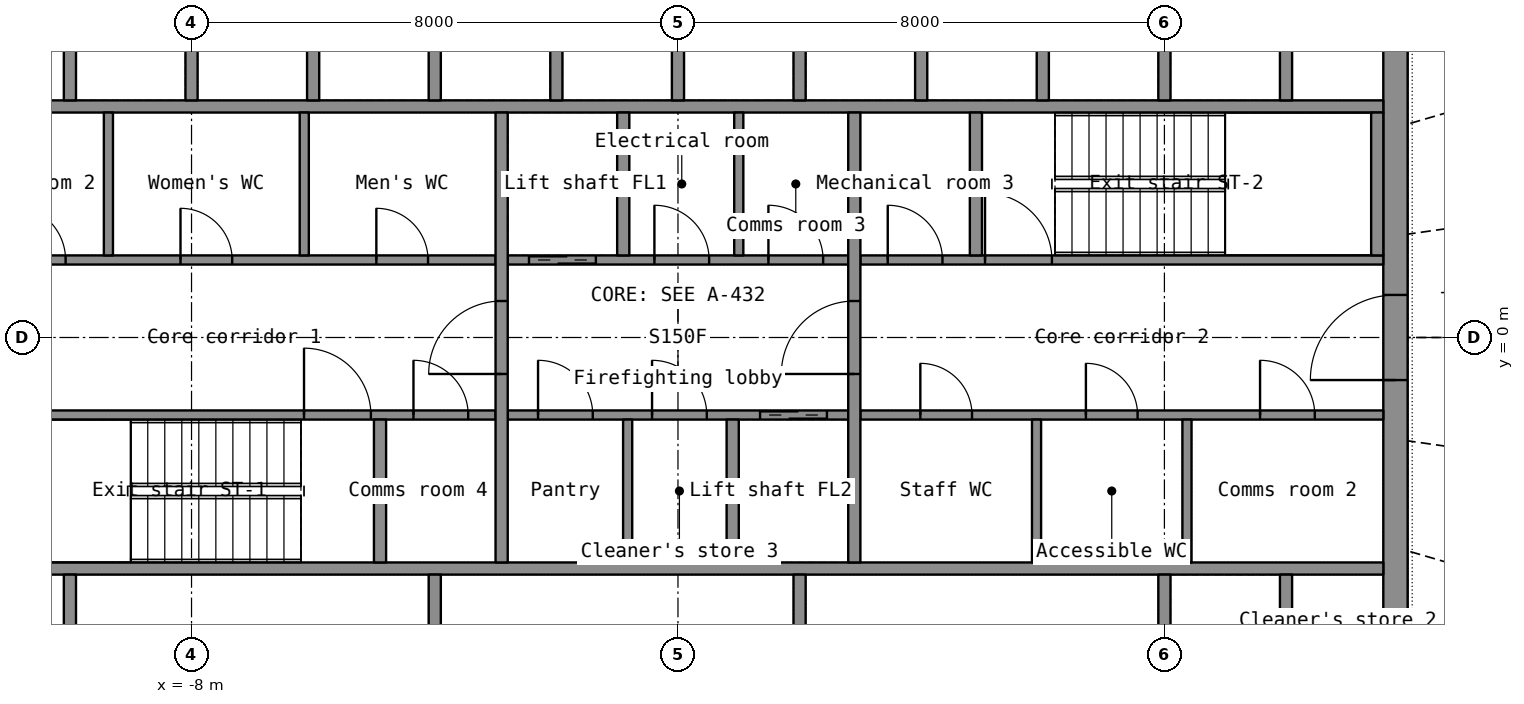
"""IFC4 building model, lengths in metres.
Left out: names, types, materials, properties, quantities, classifications, styles, units other than length and angle.
Written with IfcOpenShell. Run it as: python <this file> out.ifc"""

import sys

from ifc_helpers import new_model, si_unit, direction, frame, frame_2d, origin, place, context, subcontext, project, spatial, rectangle, extrude, element, fill, save


model = new_model("IFC4")
c1 = context("Model", 3, precision=1e-05, world=origin(), true_north=direction((0.0, 1.0)))
c2 = subcontext(c1, "Body", "Model", "MODEL_VIEW")
j1 = project(units=[si_unit("LENGTHUNIT", "METRE"), si_unit("PLANEANGLEUNIT", "RADIAN")], contexts=[c1])
p1 = place(None, origin())
s1 = spatial("IfcSite", under=j1, at=p1, CompositionType="ELEMENT")
p2 = place(p1, origin())
s2 = spatial("IfcBuilding", under=s1, at=p2, CompositionType="ELEMENT")
p3 = place(p2, frame((0.0, 0.0, 254.1)))
s3 = spatial("IfcBuildingStorey", under=s2, at=p3, CompositionType="ELEMENT", Elevation=254.1)
p4 = place(p3, frame((11.8, -7.2, 0.0), z_axis=(0.0, 0.0, 1.0), x_axis=(0.0, 1.0, 0.0)))
e1 = element("IfcWall", 1, at=p4, inside=s3, PredefinedType="SHEAR", context=c2, shape_type="SweptSolid", body=[
    extrude(rectangle(XDim=14.4, YDim=0.4, at=frame_2d((7.2, 0.0))), origin(), (0.0, 0.0, 1.0), 3.3),
])
p5 = place(p4, frame((6.5, 0.0, 0.0)))
e2 = element("IfcOpeningElement", 2, at=p5, cuts=e1, PredefinedType="OPENING", context=c2, shape_type="SweptSolid", body=[
    extrude(rectangle(XDim=1.4, YDim=2.2, at=frame_2d((0.7, 1.1))), frame((0.0, 0.21, 0.0), z_axis=(0.0, -1.0, 0.0), x_axis=(1.0, 0.0, 0.0)), (0.0, 0.0, 1.0), 0.42),
])
for number, where, z_axis, x_axis in (
    (3, (-11.6, -3.8, 0.0), (0.0, 0.0, 1.0), (1.0, 0.0, 0.0)),
    (4, (-11.6, 3.8, 0.0), (0.0, 0.0, 1.0), (1.0, 0.0, 0.0)),
):
    element("IfcWall", number, at=place(p3, frame(where, z_axis=z_axis, x_axis=x_axis)), inside=s3, PredefinedType="SHEAR", context=c2, shape_type="SweptSolid", body=[
        extrude(rectangle(XDim=23.2, YDim=0.2, at=frame_2d((11.6, 0.0))), origin(), (0.0, 0.0, 1.0), 3.3),
    ])
for number, where, z_axis, x_axis in (
    (5, (-10.0, -6.8, 0.0), (0.0, 0.0, 1.0), (0.0, 1.0, 0.0)),
    (6, (8.0, -6.8, 0.0), (0.0, 0.0, 1.0), (0.0, 1.0, 0.0)),
    (7, (10.0, -6.8, 0.0), (0.0, 0.0, 1.0), (0.0, 1.0, 0.0)),
):
    element("IfcWall", number, at=place(p3, frame(where, z_axis=z_axis, x_axis=x_axis)), inside=s3, PredefinedType="SHEAR", context=c2, shape_type="SweptSolid", body=[
        extrude(rectangle(XDim=2.9, YDim=0.2, at=frame_2d((1.45, 0.0))), origin(), (0.0, 0.0, 1.0), 3.3),
    ])
for number, where, z_axis, x_axis in (
    (8, (-4.0, -6.8, 0.0), (0.0, 0.0, 1.0), (0.0, 1.0, 0.0)),
    (9, (2.0, -6.8, 0.0), (0.0, 0.0, 1.0), (0.0, 1.0, 0.0)),
):
    element("IfcWall", number, at=place(p3, frame(where, z_axis=z_axis, x_axis=x_axis)), inside=s3, PredefinedType="PARTITIONING", context=c2, shape_type="SweptSolid", body=[
        extrude(rectangle(XDim=2.9, YDim=0.2, at=frame_2d((1.45, 0.0))), origin(), (0.0, 0.0, 1.0), 3.3),
    ])
for number, where, z_axis, x_axis in (
    (10, (-10.0, 3.9, 0.0), (0.0, 0.0, 1.0), (0.0, 1.0, 0.0)),
    (11, (-8.0, 3.9, 0.0), (0.0, 0.0, 1.0), (0.0, 1.0, 0.0)),
    (12, (-6.0, 3.9, 0.0), (0.0, 0.0, 1.0), (0.0, 1.0, 0.0)),
    (13, (-4.0, 3.9, 0.0), (0.0, 0.0, 1.0), (0.0, 1.0, 0.0)),
    (14, (-2.0, 3.9, 0.0), (0.0, 0.0, 1.0), (0.0, 1.0, 0.0)),
    (15, (0.0, 3.9, 0.0), (0.0, 0.0, 1.0), (0.0, 1.0, 0.0)),
    (16, (2.0, 3.9, 0.0), (0.0, 0.0, 1.0), (0.0, 1.0, 0.0)),
    (17, (4.0, 3.9, 0.0), (0.0, 0.0, 1.0), (0.0, 1.0, 0.0)),
    (18, (6.0, 3.9, 0.0), (0.0, 0.0, 1.0), (0.0, 1.0, 0.0)),
    (19, (8.0, 3.9, 0.0), (0.0, 0.0, 1.0), (0.0, 1.0, 0.0)),
    (20, (10.0, 3.9, 0.0), (0.0, 0.0, 1.0), (0.0, 1.0, 0.0)),
):
    element("IfcWall", number, at=place(p3, frame(where, z_axis=z_axis, x_axis=x_axis)), inside=s3, PredefinedType="SHEAR", context=c2, shape_type="SweptSolid", body=[
        extrude(rectangle(XDim=2.9, YDim=0.2, at=frame_2d((1.45, 0.0))), origin(), (0.0, 0.0, 1.0), 3.3),
    ])
p6 = place(p3, frame((-11.6, -1.275, 0.0), z_axis=(0.0, 0.0, 1.0), x_axis=(1.0, 0.0, 0.0)))
e21 = element("IfcWall", 21, at=p6, inside=s3, PredefinedType="SHEAR", context=c2, shape_type="SweptSolid", body=[
    extrude(rectangle(XDim=8.6, YDim=0.15, at=frame_2d((4.3, 0.0))), origin(), (0.0, 0.0, 1.0), 3.3),
])
p7 = place(p6, frame((5.45, 0.0, 0.0)))
e22 = element("IfcOpeningElement", 22, at=p7, cuts=e21, PredefinedType="OPENING", context=c2, shape_type="SweptSolid", body=[
    extrude(rectangle(XDim=1.1, YDim=2.15, at=frame_2d((0.55, 1.075))), frame((0.0, 0.085, 0.0), z_axis=(0.0, -1.0, 0.0), x_axis=(1.0, 0.0, 0.0)), (0.0, 0.0, 1.0), 0.17),
])
p8 = place(p6, frame((7.25, 0.0, 0.0)))
e23 = element("IfcOpeningElement", 23, at=p8, cuts=e21, PredefinedType="OPENING", context=c2, shape_type="SweptSolid", body=[
    extrude(rectangle(XDim=0.9, YDim=2.1, at=frame_2d((0.45, 1.05))), frame((0.0, 0.085, 0.0), z_axis=(0.0, -1.0, 0.0), x_axis=(1.0, 0.0, 0.0)), (0.0, 0.0, 1.0), 0.17),
])
p9 = place(p3, frame((-2.8, -1.275, 0.0), z_axis=(0.0, 0.0, 1.0), x_axis=(1.0, 0.0, 0.0)))
e24 = element("IfcWall", 24, at=p9, inside=s3, PredefinedType="SHEAR", context=c2, shape_type="SweptSolid", body=[
    extrude(rectangle(XDim=5.6, YDim=0.15, at=frame_2d((2.8, 0.0))), origin(), (0.0, 0.0, 1.0), 3.3),
])
p10 = place(p9, frame((4.15, 0.0, 0.0)))
e25 = element("IfcOpeningElement", 25, at=p10, cuts=e24, PredefinedType="OPENING", context=c2, shape_type="SweptSolid", body=[
    extrude(rectangle(XDim=1.1, YDim=2.2, at=frame_2d((0.55, 1.1))), frame((0.0, 0.085, 0.0), z_axis=(0.0, -1.0, 0.0), x_axis=(1.0, 0.0, 0.0)), (0.0, 0.0, 1.0), 0.17),
])
p11 = place(p9, frame((0.499, 0.0, 0.0)))
e26 = element("IfcOpeningElement", 26, at=p11, cuts=e24, PredefinedType="OPENING", context=c2, shape_type="SweptSolid", body=[
    extrude(rectangle(XDim=0.9, YDim=2.1, at=frame_2d((0.45, 1.05))), frame((0.0, 0.085, 0.0), z_axis=(0.0, -1.0, 0.0), x_axis=(1.0, 0.0, 0.0)), (0.0, 0.0, 1.0), 0.17),
])
p12 = place(p9, frame((2.374, 0.0, 0.0)))
e27 = element("IfcOpeningElement", 27, at=p12, cuts=e24, PredefinedType="OPENING", context=c2, shape_type="SweptSolid", body=[
    extrude(rectangle(XDim=0.9, YDim=2.1, at=frame_2d((0.45, 1.05))), frame((0.0, 0.085, 0.0), z_axis=(0.0, -1.0, 0.0), x_axis=(1.0, 0.0, 0.0)), (0.0, 0.0, 1.0), 0.17),
])
p13 = place(p3, frame((3.0, -1.275, 0.0), z_axis=(0.0, 0.0, 1.0), x_axis=(1.0, 0.0, 0.0)))
e28 = element("IfcWall", 28, at=p13, inside=s3, PredefinedType="PARTITIONING", context=c2, shape_type="SweptSolid", body=[
    extrude(rectangle(XDim=8.6, YDim=0.15, at=frame_2d((4.3, 0.0))), origin(), (0.0, 0.0, 1.0), 3.3),
])
p14 = place(p13, frame((0.986, 0.0, 0.0)))
e29 = element("IfcOpeningElement", 29, at=p14, cuts=e28, PredefinedType="OPENING", context=c2, shape_type="SweptSolid", body=[
    extrude(rectangle(XDim=0.85, YDim=2.1, at=frame_2d((0.425, 1.05))), frame((0.0, 0.085, 0.0), z_axis=(0.0, -1.0, 0.0), x_axis=(1.0, 0.0, 0.0)), (0.0, 0.0, 1.0), 0.17),
])
p15 = place(p13, frame((3.709, 0.0, 0.0)))
e30 = element("IfcOpeningElement", 30, at=p15, cuts=e28, PredefinedType="OPENING", context=c2, shape_type="SweptSolid", body=[
    extrude(rectangle(XDim=0.85, YDim=2.1, at=frame_2d((0.425, 1.05))), frame((0.0, 0.085, 0.0), z_axis=(0.0, -1.0, 0.0), x_axis=(1.0, 0.0, 0.0)), (0.0, 0.0, 1.0), 0.17),
])
p16 = place(p13, frame((6.573, 0.0, 0.0)))
e31 = element("IfcOpeningElement", 31, at=p16, cuts=e28, PredefinedType="OPENING", context=c2, shape_type="SweptSolid", body=[
    extrude(rectangle(XDim=0.9, YDim=2.1, at=frame_2d((0.45, 1.05))), frame((0.0, 0.085, 0.0), z_axis=(0.0, -1.0, 0.0), x_axis=(1.0, 0.0, 0.0)), (0.0, 0.0, 1.0), 0.17),
])
p17 = place(p3, frame((-11.6, 1.275, 0.0), z_axis=(0.0, 0.0, 1.0), x_axis=(1.0, 0.0, 0.0)))
e32 = element("IfcWall", 32, at=p17, inside=s3, PredefinedType="PARTITIONING", context=c2, shape_type="SweptSolid", body=[
    extrude(rectangle(XDim=8.6, YDim=0.15, at=frame_2d((4.3, 0.0))), origin(), (0.0, 0.0, 1.0), 3.3),
])
p18 = place(p17, frame((0.629, 0.0, 0.0)))
e33 = element("IfcOpeningElement", 33, at=p18, cuts=e32, PredefinedType="OPENING", context=c2, shape_type="SweptSolid", body=[
    extrude(rectangle(XDim=0.9, YDim=2.1, at=frame_2d((0.45, 1.05))), frame((0.0, 0.085, 0.0), z_axis=(0.0, -1.0, 0.0), x_axis=(1.0, 0.0, 0.0)), (0.0, 0.0, 1.0), 0.17),
])
p19 = place(p17, frame((3.418, 0.0, 0.0)))
e34 = element("IfcOpeningElement", 34, at=p19, cuts=e32, PredefinedType="OPENING", context=c2, shape_type="SweptSolid", body=[
    extrude(rectangle(XDim=0.85, YDim=2.1, at=frame_2d((0.425, 1.05))), frame((0.0, 0.085, 0.0), z_axis=(0.0, -1.0, 0.0), x_axis=(1.0, 0.0, 0.0)), (0.0, 0.0, 1.0), 0.17),
])
p20 = place(p17, frame((6.639, 0.0, 0.0)))
e35 = element("IfcOpeningElement", 35, at=p20, cuts=e32, PredefinedType="OPENING", context=c2, shape_type="SweptSolid", body=[
    extrude(rectangle(XDim=0.85, YDim=2.1, at=frame_2d((0.425, 1.05))), frame((0.0, 0.085, 0.0), z_axis=(0.0, -1.0, 0.0), x_axis=(1.0, 0.0, 0.0)), (0.0, 0.0, 1.0), 0.17),
])
p21 = place(p3, frame((-2.8, 1.275, 0.0), z_axis=(0.0, 0.0, 1.0), x_axis=(1.0, 0.0, 0.0)))
e36 = element("IfcWall", 36, at=p21, inside=s3, PredefinedType="SHEAR", context=c2, shape_type="SweptSolid", body=[
    extrude(rectangle(XDim=5.6, YDim=0.15, at=frame_2d((2.8, 0.0))), origin(), (0.0, 0.0, 1.0), 3.3),
])
p22 = place(p21, frame((0.35, 0.0, 0.0)))
e37 = element("IfcOpeningElement", 37, at=p22, cuts=e36, PredefinedType="OPENING", context=c2, shape_type="SweptSolid", body=[
    extrude(rectangle(XDim=1.1, YDim=2.2, at=frame_2d((0.55, 1.1))), frame((0.0, 0.085, 0.0), z_axis=(0.0, -1.0, 0.0), x_axis=(1.0, 0.0, 0.0)), (0.0, 0.0, 1.0), 0.17),
])
p23 = place(p21, frame((2.413, 0.0, 0.0)))
e38 = element("IfcOpeningElement", 38, at=p23, cuts=e36, PredefinedType="OPENING", context=c2, shape_type="SweptSolid", body=[
    extrude(rectangle(XDim=0.9, YDim=2.1, at=frame_2d((0.45, 1.05))), frame((0.0, 0.085, 0.0), z_axis=(0.0, -1.0, 0.0), x_axis=(1.0, 0.0, 0.0)), (0.0, 0.0, 1.0), 0.17),
])
p24 = place(p21, frame((4.288, 0.0, 0.0)))
e39 = element("IfcOpeningElement", 39, at=p24, cuts=e36, PredefinedType="OPENING", context=c2, shape_type="SweptSolid", body=[
    extrude(rectangle(XDim=0.9, YDim=2.1, at=frame_2d((0.45, 1.05))), frame((0.0, 0.085, 0.0), z_axis=(0.0, -1.0, 0.0), x_axis=(1.0, 0.0, 0.0)), (0.0, 0.0, 1.0), 0.17),
])
p25 = place(p3, frame((3.0, 1.275, 0.0), z_axis=(0.0, 0.0, 1.0), x_axis=(1.0, 0.0, 0.0)))
e40 = element("IfcWall", 40, at=p25, inside=s3, PredefinedType="SHEAR", context=c2, shape_type="SweptSolid", body=[
    extrude(rectangle(XDim=8.6, YDim=0.15, at=frame_2d((4.3, 0.0))), origin(), (0.0, 0.0, 1.0), 3.3),
])
p26 = place(p25, frame((2.05, 0.0, 0.0)))
e41 = element("IfcOpeningElement", 41, at=p26, cuts=e40, PredefinedType="OPENING", context=c2, shape_type="SweptSolid", body=[
    extrude(rectangle(XDim=1.1, YDim=2.15, at=frame_2d((0.55, 1.075))), frame((0.0, 0.085, 0.0), z_axis=(0.0, -1.0, 0.0), x_axis=(1.0, 0.0, 0.0)), (0.0, 0.0, 1.0), 0.17),
])
p27 = place(p25, frame((0.45, 0.0, 0.0)))
e42 = element("IfcOpeningElement", 42, at=p27, cuts=e40, PredefinedType="OPENING", context=c2, shape_type="SweptSolid", body=[
    extrude(rectangle(XDim=0.9, YDim=2.1, at=frame_2d((0.45, 1.05))), frame((0.0, 0.085, 0.0), z_axis=(0.0, -1.0, 0.0), x_axis=(1.0, 0.0, 0.0)), (0.0, 0.0, 1.0), 0.17),
])
p28 = place(p3, frame((-2.9, -3.7, 0.0), z_axis=(0.0, 0.0, 1.0), x_axis=(0.0, 1.0, 0.0)))
e43 = element("IfcWall", 43, at=p28, inside=s3, PredefinedType="SHEAR", context=c2, shape_type="SweptSolid", body=[
    extrude(rectangle(XDim=7.4, YDim=0.2, at=frame_2d((3.7, 0.0))), origin(), (0.0, 0.0, 1.0), 3.3),
])
p29 = place(p28, frame((3.1, 0.0, 0.0)))
e44 = element("IfcOpeningElement", 44, at=p29, cuts=e43, PredefinedType="OPENING", context=c2, shape_type="SweptSolid", body=[
    extrude(rectangle(XDim=1.2, YDim=2.2, at=frame_2d((0.6, 1.1))), frame((0.0, 0.11, 0.0), z_axis=(0.0, -1.0, 0.0), x_axis=(1.0, 0.0, 0.0)), (0.0, 0.0, 1.0), 0.22),
])
p30 = place(p3, frame((2.9, -3.7, 0.0), z_axis=(0.0, 0.0, 1.0), x_axis=(0.0, 1.0, 0.0)))
e45 = element("IfcWall", 45, at=p30, inside=s3, PredefinedType="SHEAR", context=c2, shape_type="SweptSolid", body=[
    extrude(rectangle(XDim=7.4, YDim=0.2, at=frame_2d((3.7, 0.0))), origin(), (0.0, 0.0, 1.0), 3.3),
])
p31 = place(p30, frame((3.1, 0.0, 0.0)))
e46 = element("IfcOpeningElement", 46, at=p31, cuts=e45, PredefinedType="OPENING", context=c2, shape_type="SweptSolid", body=[
    extrude(rectangle(XDim=1.2, YDim=2.2, at=frame_2d((0.6, 1.1))), frame((0.0, 0.11, 0.0), z_axis=(0.0, -1.0, 0.0), x_axis=(1.0, 0.0, 0.0)), (0.0, 0.0, 1.0), 0.22),
])
for number, where, z_axis, x_axis in (
    (47, (-0.9, 1.35, 0.0), (0.0, 0.0, 1.0), (0.0, 1.0, 0.0)),
    (48, (0.9, -3.7, 0.0), (0.0, 0.0, 1.0), (0.0, 1.0, 0.0)),
    (49, (11.5, 1.35, 0.0), (0.0, 0.0, 1.0), (0.0, 1.0, 0.0)),
    (50, (-4.9, -3.7, 0.0), (0.0, 0.0, 1.0), (0.0, 1.0, 0.0)),
    (51, (4.9, 1.35, 0.0), (0.0, 0.0, 1.0), (0.0, 1.0, 0.0)),
):
    element("IfcWall", number, at=place(p3, frame(where, z_axis=z_axis, x_axis=x_axis)), inside=s3, PredefinedType="SHEAR", context=c2, shape_type="SweptSolid", body=[
        extrude(rectangle(XDim=2.35, YDim=0.2, at=frame_2d((1.175, 0.0))), origin(), (0.0, 0.0, 1.0), 3.3),
    ])
for number, where, z_axis, x_axis in (
    (52, (-9.367, 1.35, 0.0), (0.0, 0.0, 1.0), (0.0, 1.0, 0.0)),
    (53, (-6.146, 1.35, 0.0), (0.0, 0.0, 1.0), (0.0, 1.0, 0.0)),
    (54, (5.897, -3.7, 0.0), (0.0, 0.0, 1.0), (0.0, 1.0, 0.0)),
    (55, (8.371, -3.7, 0.0), (0.0, 0.0, 1.0), (0.0, 1.0, 0.0)),
    (56, (1.0, 1.35, 0.0), (0.0, 0.0, 1.0), (0.0, 1.0, 0.0)),
    (57, (-0.827, -3.7, 0.0), (0.0, 0.0, 1.0), (0.0, 1.0, 0.0)),
):
    element("IfcWall", number, at=place(p3, frame(where, z_axis=z_axis, x_axis=x_axis)), inside=s3, PredefinedType="PARTITIONING", context=c2, shape_type="SweptSolid", body=[
        extrude(rectangle(XDim=2.35, YDim=0.15, at=frame_2d((1.175, 0.0))), origin(), (0.0, 0.0, 1.0), 3.3),
    ])
p32 = place(p5, origin())
e58 = element("IfcDoor", 58, at=p32, inside=s3, OperationType="DOUBLE_DOOR_SINGLE_SWING", PredefinedType="DOOR", context=c2, shape_type="SweptSolid", body=[
    extrude(rectangle(XDim=1.4, YDim=2.2, at=frame_2d((0.7, 1.1))), frame((0.0, 0.025, 0.0), z_axis=(0.0, -1.0, 0.0), x_axis=(1.0, 0.0, 0.0)), (0.0, 0.0, 1.0), 0.05),
])
fill(e2, e58)
p33 = place(p29, origin())
e59 = element("IfcDoor", 59, at=p33, inside=s3, OperationType="SINGLE_SWING_LEFT", PredefinedType="DOOR", context=c2, shape_type="SweptSolid", body=[
    extrude(rectangle(XDim=1.2, YDim=2.2, at=frame_2d((0.6, 1.1))), frame((0.0, 0.025, 0.0), z_axis=(0.0, -1.0, 0.0), x_axis=(1.0, 0.0, 0.0)), (0.0, 0.0, 1.0), 0.05),
])
fill(e44, e59)
p34 = place(p31, origin())
e60 = element("IfcDoor", 60, at=p34, inside=s3, OperationType="SINGLE_SWING_LEFT", PredefinedType="DOOR", context=c2, shape_type="SweptSolid", body=[
    extrude(rectangle(XDim=1.2, YDim=2.2, at=frame_2d((0.6, 1.1))), frame((0.0, 0.025, 0.0), z_axis=(0.0, -1.0, 0.0), x_axis=(1.0, 0.0, 0.0)), (0.0, 0.0, 1.0), 0.05),
])
fill(e46, e60)
p35 = place(p22, origin())
e61 = element("IfcDoor", 61, at=p35, inside=s3, OperationType="DOUBLE_DOOR_SLIDING", PredefinedType="DOOR", context=c2, shape_type="SweptSolid", body=[
    extrude(rectangle(XDim=1.1, YDim=2.2, at=frame_2d((0.55, 1.1))), frame((0.0, 0.025, 0.0), z_axis=(0.0, -1.0, 0.0), x_axis=(1.0, 0.0, 0.0)), (0.0, 0.0, 1.0), 0.05),
])
fill(e37, e61)
p36 = place(p10, origin())
e62 = element("IfcDoor", 62, at=p36, inside=s3, OperationType="DOUBLE_DOOR_SLIDING", PredefinedType="DOOR", context=c2, shape_type="SweptSolid", body=[
    extrude(rectangle(XDim=1.1, YDim=2.2, at=frame_2d((0.55, 1.1))), frame((0.0, 0.025, 0.0), z_axis=(0.0, -1.0, 0.0), x_axis=(1.0, 0.0, 0.0)), (0.0, 0.0, 1.0), 0.05),
])
fill(e25, e62)
p37 = place(p7, origin())
e63 = element("IfcDoor", 63, at=p37, inside=s3, OperationType="SINGLE_SWING_LEFT", PredefinedType="DOOR", context=c2, shape_type="SweptSolid", body=[
    extrude(rectangle(XDim=1.1, YDim=2.15, at=frame_2d((0.55, 1.075))), frame((0.0, 0.025, 0.0), z_axis=(0.0, -1.0, 0.0), x_axis=(1.0, 0.0, 0.0)), (0.0, 0.0, 1.0), 0.05),
])
fill(e22, e63)
p38 = place(p26, origin())
e64 = element("IfcDoor", 64, at=p38, inside=s3, OperationType="SINGLE_SWING_LEFT", PredefinedType="DOOR", context=c2, shape_type="SweptSolid", body=[
    extrude(rectangle(XDim=1.1, YDim=2.15, at=frame_2d((0.55, 1.075))), frame((0.0, 0.025, 0.0), z_axis=(0.0, -1.0, 0.0), x_axis=(1.0, 0.0, 0.0)), (0.0, 0.0, 1.0), 0.05),
])
fill(e41, e64)
p39 = place(p18, origin())
e65 = element("IfcDoor", 65, at=p39, inside=s3, OperationType="SINGLE_SWING_LEFT", PredefinedType="DOOR", context=c2, shape_type="SweptSolid", body=[
    extrude(rectangle(XDim=0.9, YDim=2.1, at=frame_2d((0.45, 1.05))), frame((0.0, 0.025, 0.0), z_axis=(0.0, -1.0, 0.0), x_axis=(1.0, 0.0, 0.0)), (0.0, 0.0, 1.0), 0.05),
])
fill(e33, e65)
p40 = place(p19, origin())
e66 = element("IfcDoor", 66, at=p40, inside=s3, OperationType="SINGLE_SWING_LEFT", PredefinedType="DOOR", context=c2, shape_type="SweptSolid", body=[
    extrude(rectangle(XDim=0.85, YDim=2.1, at=frame_2d((0.425, 1.05))), frame((0.0, 0.025, 0.0), z_axis=(0.0, -1.0, 0.0), x_axis=(1.0, 0.0, 0.0)), (0.0, 0.0, 1.0), 0.05),
])
fill(e34, e66)
p41 = place(p20, origin())
e67 = element("IfcDoor", 67, at=p41, inside=s3, OperationType="SINGLE_SWING_LEFT", PredefinedType="DOOR", context=c2, shape_type="SweptSolid", body=[
    extrude(rectangle(XDim=0.85, YDim=2.1, at=frame_2d((0.425, 1.05))), frame((0.0, 0.025, 0.0), z_axis=(0.0, -1.0, 0.0), x_axis=(1.0, 0.0, 0.0)), (0.0, 0.0, 1.0), 0.05),
])
fill(e35, e67)
p42 = place(p14, origin())
e68 = element("IfcDoor", 68, at=p42, inside=s3, OperationType="SINGLE_SWING_LEFT", PredefinedType="DOOR", context=c2, shape_type="SweptSolid", body=[
    extrude(rectangle(XDim=0.85, YDim=2.1, at=frame_2d((0.425, 1.05))), frame((0.0, 0.025, 0.0), z_axis=(0.0, -1.0, 0.0), x_axis=(1.0, 0.0, 0.0)), (0.0, 0.0, 1.0), 0.05),
])
fill(e29, e68)
p43 = place(p15, origin())
e69 = element("IfcDoor", 69, at=p43, inside=s3, OperationType="SINGLE_SWING_LEFT", PredefinedType="DOOR", context=c2, shape_type="SweptSolid", body=[
    extrude(rectangle(XDim=0.85, YDim=2.1, at=frame_2d((0.425, 1.05))), frame((0.0, 0.025, 0.0), z_axis=(0.0, -1.0, 0.0), x_axis=(1.0, 0.0, 0.0)), (0.0, 0.0, 1.0), 0.05),
])
fill(e30, e69)
p44 = place(p16, origin())
e70 = element("IfcDoor", 70, at=p44, inside=s3, OperationType="SINGLE_SWING_LEFT", PredefinedType="DOOR", context=c2, shape_type="SweptSolid", body=[
    extrude(rectangle(XDim=0.9, YDim=2.1, at=frame_2d((0.45, 1.05))), frame((0.0, 0.025, 0.0), z_axis=(0.0, -1.0, 0.0), x_axis=(1.0, 0.0, 0.0)), (0.0, 0.0, 1.0), 0.05),
])
fill(e31, e70)
p45 = place(p23, origin())
e71 = element("IfcDoor", 71, at=p45, inside=s3, OperationType="SINGLE_SWING_LEFT", PredefinedType="DOOR", context=c2, shape_type="SweptSolid", body=[
    extrude(rectangle(XDim=0.9, YDim=2.1, at=frame_2d((0.45, 1.05))), frame((0.0, 0.025, 0.0), z_axis=(0.0, -1.0, 0.0), x_axis=(1.0, 0.0, 0.0)), (0.0, 0.0, 1.0), 0.05),
])
fill(e38, e71)
p46 = place(p24, origin())
e72 = element("IfcDoor", 72, at=p46, inside=s3, OperationType="SINGLE_SWING_LEFT", PredefinedType="DOOR", context=c2, shape_type="SweptSolid", body=[
    extrude(rectangle(XDim=0.9, YDim=2.1, at=frame_2d((0.45, 1.05))), frame((0.0, 0.025, 0.0), z_axis=(0.0, -1.0, 0.0), x_axis=(1.0, 0.0, 0.0)), (0.0, 0.0, 1.0), 0.05),
])
fill(e39, e72)
p47 = place(p11, origin())
e73 = element("IfcDoor", 73, at=p47, inside=s3, OperationType="SINGLE_SWING_LEFT", PredefinedType="DOOR", context=c2, shape_type="SweptSolid", body=[
    extrude(rectangle(XDim=0.9, YDim=2.1, at=frame_2d((0.45, 1.05))), frame((0.0, 0.025, 0.0), z_axis=(0.0, -1.0, 0.0), x_axis=(1.0, 0.0, 0.0)), (0.0, 0.0, 1.0), 0.05),
])
fill(e26, e73)
p48 = place(p12, origin())
e74 = element("IfcDoor", 74, at=p48, inside=s3, OperationType="SINGLE_SWING_LEFT", PredefinedType="DOOR", context=c2, shape_type="SweptSolid", body=[
    extrude(rectangle(XDim=0.9, YDim=2.1, at=frame_2d((0.45, 1.05))), frame((0.0, 0.025, 0.0), z_axis=(0.0, -1.0, 0.0), x_axis=(1.0, 0.0, 0.0)), (0.0, 0.0, 1.0), 0.05),
])
fill(e27, e74)
p49 = place(p27, origin())
e75 = element("IfcDoor", 75, at=p49, inside=s3, OperationType="SINGLE_SWING_LEFT", PredefinedType="DOOR", context=c2, shape_type="SweptSolid", body=[
    extrude(rectangle(XDim=0.9, YDim=2.1, at=frame_2d((0.45, 1.05))), frame((0.0, 0.025, 0.0), z_axis=(0.0, -1.0, 0.0), x_axis=(1.0, 0.0, 0.0)), (0.0, 0.0, 1.0), 0.05),
])
fill(e42, e75)
p50 = place(p8, origin())
e76 = element("IfcDoor", 76, at=p50, inside=s3, OperationType="SINGLE_SWING_LEFT", PredefinedType="DOOR", context=c2, shape_type="SweptSolid", body=[
    extrude(rectangle(XDim=0.9, YDim=2.1, at=frame_2d((0.45, 1.05))), frame((0.0, 0.025, 0.0), z_axis=(0.0, -1.0, 0.0), x_axis=(1.0, 0.0, 0.0)), (0.0, 0.0, 1.0), 0.05),
])
fill(e23, e76)
save(model, sys.argv[1])
